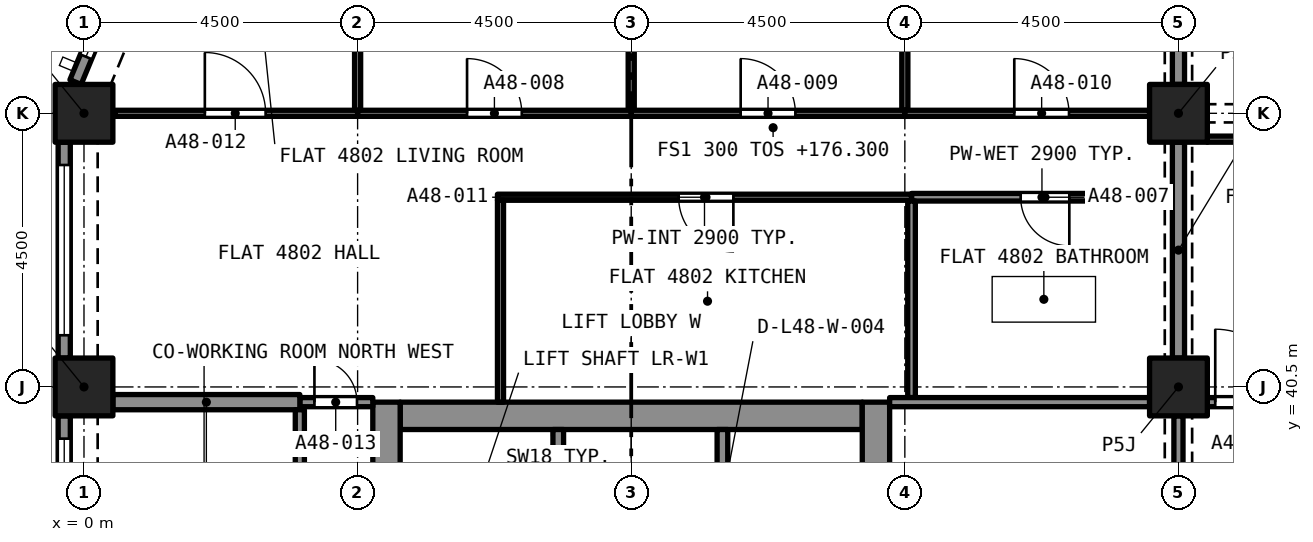
"""IFC4 building model, lengths in metres.
Left out: names, types, materials, properties, quantities, classifications, styles, units other than length and angle.
Written with IfcOpenShell. Run it as: python <this file> out.ifc"""

import sys

from ifc_helpers import new_model, si_unit, direction, frame, frame_2d, origin, origin_2d, place, context, subcontext, project, spatial, rectangle, extrude, element, fill, save


model = new_model("IFC4")
c1 = context("Model", 3, precision=1e-05, world=origin(), true_north=direction((0.0, 1.0)))
c2 = subcontext(c1, "Body", "Model", "MODEL_VIEW")
j1 = project(units=[si_unit("LENGTHUNIT", "METRE"), si_unit("PLANEANGLEUNIT", "RADIAN")], contexts=[c1])
p1 = place(None, origin())
s1 = spatial("IfcSite", under=j1, at=p1, CompositionType="ELEMENT")
p2 = place(p1, origin())
s2 = spatial("IfcBuilding", under=s1, at=p2, CompositionType="ELEMENT")
p3 = place(p2, frame((0.0, 0.0, 176.3)))
s3 = spatial("IfcBuildingStorey", under=s2, at=p3, CompositionType="ELEMENT", Elevation=176.3)
for number, where, z_axis, x_axis in (
    (1, (0.0, 40.5, 0.0), (0.0, 0.0, 1.0), (1.0, 0.0, 0.0)),
    (2, (18.0, 40.5, 0.0), (0.0, 0.0, 1.0), (1.0, 0.0, 0.0)),
    (3, (0.0, 45.0, 0.0), (0.0, 0.0, 1.0), (1.0, 0.0, 0.0)),
    (4, (18.0, 45.0, 0.0), (0.0, 0.0, 1.0), (1.0, 0.0, 0.0)),
):
    element("IfcColumn", number, at=place(p3, frame(where, z_axis=z_axis, x_axis=x_axis)), inside=s3, PredefinedType="COLUMN", context=c2, shape_type="SweptSolid", body=[
        extrude(rectangle(XDim=0.95, YDim=0.95, at=origin_2d()), origin(), (0.0, 0.0, 1.0), 3.2),
    ])
p4 = place(p3, frame((5.2, 40.025, 0.0), z_axis=(0.0, 0.0, 1.0), x_axis=(1.0, 0.0, 0.0)))
e5 = element("IfcWall", 5, at=p4, inside=s3, PredefinedType="SOLIDWALL", context=c2, shape_type="SweptSolid", body=[
    extrude(rectangle(XDim=7.6, YDim=0.45, at=frame_2d((3.8, 0.0))), origin(), (0.0, 0.0, 1.0), 3.2),
])
p5 = place(p3, frame((4.975, 27.25, 0.0), z_axis=(0.0, 0.0, 1.0), x_axis=(0.0, 1.0, 0.0)))
e6 = element("IfcWall", 6, at=p5, inside=s3, PredefinedType="SOLIDWALL", context=c2, shape_type="SweptSolid", body=[
    extrude(rectangle(XDim=13.0, YDim=0.45, at=frame_2d((6.5, 0.0))), origin(), (0.0, 0.0, 1.0), 3.2),
])
p6 = place(p5, frame((8.7, 0.0, 0.0)))
e7 = element("IfcOpeningElement", 7, at=p6, cuts=e6, PredefinedType="OPENING", context=c2, shape_type="SweptSolid", body=[
    extrude(rectangle(XDim=1.2, YDim=2.1, at=frame_2d((0.6, 1.05))), frame((0.0, 0.235, 0.0), z_axis=(0.0, -1.0, 0.0), x_axis=(1.0, 0.0, 0.0)), (0.0, 0.0, 1.0), 0.47),
])
p7 = place(p3, frame((13.025, 27.25, 0.0), z_axis=(0.0, 0.0, 1.0), x_axis=(0.0, 1.0, 0.0)))
e8 = element("IfcWall", 8, at=p7, inside=s3, PredefinedType="SOLIDWALL", context=c2, shape_type="SweptSolid", body=[
    extrude(rectangle(XDim=13.0, YDim=0.45, at=frame_2d((6.5, 0.0))), origin(), (0.0, 0.0, 1.0), 3.2),
])
p8 = place(p7, frame((10.85, 0.0, 0.0)))
e9 = element("IfcOpeningElement", 9, at=p8, cuts=e8, PredefinedType="OPENING", context=c2, shape_type="SweptSolid", body=[
    extrude(rectangle(XDim=1.1, YDim=2.1, at=frame_2d((0.55, 1.05))), frame((0.0, 0.235, 0.0), z_axis=(0.0, -1.0, 0.0), x_axis=(1.0, 0.0, 0.0)), (0.0, 0.0, 1.0), 0.47),
])
p9 = place(p7, frame((8.7, 0.0, 0.0)))
e10 = element("IfcOpeningElement", 10, at=p9, cuts=e8, PredefinedType="OPENING", context=c2, shape_type="SweptSolid", body=[
    extrude(rectangle(XDim=1.2, YDim=2.1, at=frame_2d((0.6, 1.05))), frame((0.0, 0.235, 0.0), z_axis=(0.0, -1.0, 0.0), x_axis=(1.0, 0.0, 0.0)), (0.0, 0.0, 1.0), 0.47),
])
p10 = place(p3, frame((-0.139, 45.513, 0.0), z_axis=(0.0, 0.0, 1.0), x_axis=(0.382680855588, 0.923880599843, 0.0)))
e11 = element("IfcWall", 11, at=p10, inside=s3, PredefinedType="SOLIDWALL", context=c2, shape_type="SweptSolid", body=[
    extrude(rectangle(XDim=2.403, YDim=0.2, at=frame_2d((1.201, 0.0))), origin(), (0.0, 0.0, 1.0), 3.2),
])
p11 = place(p10, frame((0.451, 0.0, 0.45)))
e12 = element("IfcOpeningElement", 12, at=p11, cuts=e11, PredefinedType="OPENING", context=c2, shape_type="SweptSolid", body=[
    extrude(rectangle(XDim=1.7, YDim=1.95, at=frame_2d((0.85, 0.975))), frame((0.0, 0.11, 0.0), z_axis=(0.0, -1.0, 0.0), x_axis=(1.0, 0.0, 0.0)), (0.0, 0.0, 1.0), 0.22),
])
p12 = place(p3, frame((-0.325, 40.975, 0.0), z_axis=(0.0, 0.0, 1.0), x_axis=(0.0, 1.0, 0.0)))
e13 = element("IfcWall", 13, at=p12, inside=s3, PredefinedType="SOLIDWALL", context=c2, shape_type="SweptSolid", body=[
    extrude(rectangle(XDim=3.55, YDim=0.2, at=frame_2d((1.775, 0.0))), origin(), (0.0, 0.0, 1.0), 3.2),
])
p13 = place(p12, frame((0.375, 0.0, 0.45)))
e14 = element("IfcOpeningElement", 14, at=p13, cuts=e13, PredefinedType="OPENING", context=c2, shape_type="SweptSolid", body=[
    extrude(rectangle(XDim=2.8, YDim=1.95, at=frame_2d((1.4, 0.975))), frame((0.0, 0.11, 0.0), z_axis=(0.0, -1.0, 0.0), x_axis=(1.0, 0.0, 0.0)), (0.0, 0.0, 1.0), 0.22),
])
p14 = place(p3, frame((-0.325, 36.475, 0.0), z_axis=(0.0, 0.0, 1.0), x_axis=(0.0, 1.0, 0.0)))
e15 = element("IfcWall", 15, at=p14, inside=s3, PredefinedType="SOLIDWALL", context=c2, shape_type="SweptSolid", body=[
    extrude(rectangle(XDim=3.55, YDim=0.2, at=frame_2d((1.775, 0.0))), origin(), (0.0, 0.0, 1.0), 3.2),
])
p15 = place(p14, frame((0.375, 0.0, 0.45)))
e16 = element("IfcOpeningElement", 16, at=p15, cuts=e15, PredefinedType="OPENING", context=c2, shape_type="SweptSolid", body=[
    extrude(rectangle(XDim=2.8, YDim=1.95, at=frame_2d((1.4, 0.975))), frame((0.0, 0.11, 0.0), z_axis=(0.0, -1.0, 0.0), x_axis=(1.0, 0.0, 0.0)), (0.0, 0.0, 1.0), 0.22),
])
p16 = place(p3, frame((17.9, 43.62, 0.0), z_axis=(0.0, 0.0, 1.0), x_axis=(-1.0, 0.0, 0.0)))
e17 = element("IfcWall", 17, at=p16, inside=s3, PredefinedType="PARTITIONING", context=c2, shape_type="SweptSolid", body=[
    extrude(rectangle(XDim=4.29, YDim=0.125, at=frame_2d((2.145, 0.0))), origin(), (0.0, 0.0, 1.0), 2.9),
])
p17 = place(p16, frame((1.695, 0.0, 0.0)))
e18 = element("IfcOpeningElement", 18, at=p17, cuts=e17, PredefinedType="OPENING", context=c2, shape_type="SweptSolid", body=[
    extrude(rectangle(XDim=0.8, YDim=2.1, at=frame_2d((0.4, 1.05))), frame((0.0, 0.073, 0.0), z_axis=(0.0, -1.0, 0.0), x_axis=(1.0, 0.0, 0.0)), (0.0, 0.0, 1.0), 0.145),
])
p18 = place(p3, frame((13.61, 40.325, 0.0), z_axis=(0.0, 0.0, 1.0), x_axis=(0.0, 1.0, 0.0)))
e19 = element("IfcWall", 19, at=p18, inside=s3, PredefinedType="PARTITIONING", context=c2, shape_type="SweptSolid", body=[
    extrude(rectangle(XDim=3.233, YDim=0.125, at=frame_2d((1.616, 0.0))), origin(), (0.0, 0.0, 1.0), 2.9),
])
p19 = place(p3, frame((18.0, 40.975, 0.0), z_axis=(0.0, 0.0, 1.0), x_axis=(0.0, 1.0, 0.0)))
e20 = element("IfcWall", 20, at=p19, inside=s3, PredefinedType="PARTITIONING", context=c2, shape_type="SweptSolid", body=[
    extrude(rectangle(XDim=3.55, YDim=0.2, at=frame_2d((1.775, 0.0))), origin(), (0.0, 0.0, 1.0), 2.38),
])
p20 = place(p3, frame((9.0, 45.05, 0.0), z_axis=(0.0, 0.0, 1.0), x_axis=(0.0, 1.0, 0.0)))
e21 = element("IfcWall", 21, at=p20, inside=s3, PredefinedType="PARTITIONING", context=c2, shape_type="SweptSolid", body=[
    extrude(rectangle(XDim=3.975, YDim=0.1, at=frame_2d((1.987, 0.0))), origin(), (0.0, 0.0, 1.0), 2.9),
])
p21 = place(p3, frame((4.5, 45.0, 0.0), z_axis=(0.0, 0.0, 1.0), x_axis=(1.0, 0.0, 0.0)))
e22 = element("IfcWall", 22, at=p21, inside=s3, PredefinedType="PARTITIONING", context=c2, shape_type="SweptSolid", body=[
    extrude(rectangle(XDim=4.5, YDim=0.1, at=frame_2d((2.25, 0.0))), origin(), (0.0, 0.0, 1.0), 2.9),
])
p22 = place(p21, frame((1.8, 0.0, 0.0)))
e23 = element("IfcOpeningElement", 23, at=p22, cuts=e22, PredefinedType="OPENING", context=c2, shape_type="SweptSolid", body=[
    extrude(rectangle(XDim=0.9, YDim=2.1, at=frame_2d((0.45, 1.05))), frame((0.0, 0.06, 0.0), z_axis=(0.0, -1.0, 0.0), x_axis=(1.0, 0.0, 0.0)), (0.0, 0.0, 1.0), 0.12),
])
p23 = place(p3, frame((4.5, 45.05, 0.0), z_axis=(0.0, 0.0, 1.0), x_axis=(0.0, 1.0, 0.0)))
e24 = element("IfcWall", 24, at=p23, inside=s3, PredefinedType="PARTITIONING", context=c2, shape_type="SweptSolid", body=[
    extrude(rectangle(XDim=3.936, YDim=0.1, at=frame_2d((1.968, 0.0))), origin(), (0.0, 0.0, 1.0), 2.9),
])
p24 = place(p3, frame((13.5, 45.05, 0.0), z_axis=(0.0, 0.0, 1.0), x_axis=(0.0, 1.0, 0.0)))
e25 = element("IfcWall", 25, at=p24, inside=s3, PredefinedType="PARTITIONING", context=c2, shape_type="SweptSolid", body=[
    extrude(rectangle(XDim=3.975, YDim=0.1, at=frame_2d((1.987, 0.0))), origin(), (0.0, 0.0, 1.0), 2.9),
])
p25 = place(p3, frame((9.0, 45.0, 0.0), z_axis=(0.0, 0.0, 1.0), x_axis=(1.0, 0.0, 0.0)))
e26 = element("IfcWall", 26, at=p25, inside=s3, PredefinedType="PARTITIONING", context=c2, shape_type="SweptSolid", body=[
    extrude(rectangle(XDim=4.5, YDim=0.1, at=frame_2d((2.25, 0.0))), origin(), (0.0, 0.0, 1.0), 2.9),
])
p26 = place(p25, frame((1.8, 0.0, 0.0)))
e27 = element("IfcOpeningElement", 27, at=p26, cuts=e26, PredefinedType="OPENING", context=c2, shape_type="SweptSolid", body=[
    extrude(rectangle(XDim=0.9, YDim=2.1, at=frame_2d((0.45, 1.05))), frame((0.0, 0.06, 0.0), z_axis=(0.0, -1.0, 0.0), x_axis=(1.0, 0.0, 0.0)), (0.0, 0.0, 1.0), 0.12),
])
p27 = place(p3, frame((13.5, 45.0, 0.0), z_axis=(0.0, 0.0, 1.0), x_axis=(1.0, 0.0, 0.0)))
e28 = element("IfcWall", 28, at=p27, inside=s3, PredefinedType="PARTITIONING", context=c2, shape_type="SweptSolid", body=[
    extrude(rectangle(XDim=4.025, YDim=0.1, at=frame_2d((2.012, 0.0))), origin(), (0.0, 0.0, 1.0), 2.9),
])
p28 = place(p27, frame((1.8, 0.0, 0.0)))
e29 = element("IfcOpeningElement", 29, at=p28, cuts=e28, PredefinedType="OPENING", context=c2, shape_type="SweptSolid", body=[
    extrude(rectangle(XDim=0.9, YDim=2.1, at=frame_2d((0.45, 1.05))), frame((0.0, 0.06, 0.0), z_axis=(0.0, -1.0, 0.0), x_axis=(1.0, 0.0, 0.0)), (0.0, 0.0, 1.0), 0.12),
])
p29 = place(p3, frame((18.0, 45.475, 0.0), z_axis=(0.0, 0.0, 1.0), x_axis=(0.0, 1.0, 0.0)))
e30 = element("IfcWall", 30, at=p29, inside=s3, PredefinedType="PARTITIONING", context=c2, shape_type="SweptSolid", body=[
    extrude(rectangle(XDim=3.55, YDim=0.2, at=frame_2d((1.775, 0.0))), origin(), (0.0, 0.0, 1.0), 2.38),
])
p30 = place(p3, frame((13.61, 43.62, 0.0), z_axis=(0.0, 0.0, 1.0), x_axis=(-1.0, 0.0, 0.0)))
e31 = element("IfcWall", 31, at=p30, inside=s3, PredefinedType="PARTITIONING", context=c2, shape_type="SweptSolid", body=[
    extrude(rectangle(XDim=6.81, YDim=0.1, at=frame_2d((3.405, 0.0))), origin(), (0.0, 0.0, 1.0), 2.9),
])
p31 = place(p30, frame((2.93, 0.0, 0.0)))
e32 = element("IfcOpeningElement", 32, at=p31, cuts=e31, PredefinedType="OPENING", context=c2, shape_type="SweptSolid", body=[
    extrude(rectangle(XDim=0.9, YDim=2.1, at=frame_2d((0.45, 1.05))), frame((0.0, 0.06, 0.0), z_axis=(0.0, -1.0, 0.0), x_axis=(1.0, 0.0, 0.0)), (0.0, 0.0, 1.0), 0.12),
])
p32 = place(p3, frame((6.85, 40.25, 0.0), z_axis=(0.0, 0.0, 1.0), x_axis=(0.0, 1.0, 0.0)))
e33 = element("IfcWall", 33, at=p32, inside=s3, PredefinedType="PARTITIONING", context=c2, shape_type="SweptSolid", body=[
    extrude(rectangle(XDim=3.32, YDim=0.1, at=frame_2d((1.66, 0.0))), origin(), (0.0, 0.0, 1.0), 2.9),
])
p33 = place(p3, frame((0.514, 45.0, 0.0), z_axis=(0.0, 0.0, 1.0), x_axis=(1.0, 0.0, 0.0)))
e34 = element("IfcWall", 34, at=p33, inside=s3, PredefinedType="PARTITIONING", context=c2, shape_type="SweptSolid", body=[
    extrude(rectangle(XDim=3.986, YDim=0.1, at=frame_2d((1.993, 0.0))), origin(), (0.0, 0.0, 1.0), 2.9),
])
p34 = place(p33, frame((1.473, 0.0, 0.0)))
e35 = element("IfcOpeningElement", 35, at=p34, cuts=e34, PredefinedType="OPENING", context=c2, shape_type="SweptSolid", body=[
    extrude(rectangle(XDim=1.0, YDim=2.1, at=frame_2d((0.5, 1.05))), frame((0.0, 0.06, 0.0), z_axis=(0.0, -1.0, 0.0), x_axis=(1.0, 0.0, 0.0)), (0.0, 0.0, 1.0), 0.12),
])
p35 = place(p3, frame((3.55, 40.25, 0.0), z_axis=(0.0, 0.0, 1.0), x_axis=(1.0, 0.0, 0.0)))
e36 = element("IfcWall", 36, at=p35, inside=s3, PredefinedType="PARTITIONING", context=c2, shape_type="SweptSolid", body=[
    extrude(rectangle(XDim=1.2, YDim=0.15, at=frame_2d((0.6, 0.0))), origin(), (0.0, 0.0, 1.0), 2.9),
])
p36 = place(p35, frame((0.24, 0.0, 0.0)))
e37 = element("IfcOpeningElement", 37, at=p36, cuts=e36, PredefinedType="OPENING", context=c2, shape_type="SweptSolid", body=[
    extrude(rectangle(XDim=0.7, YDim=2.1, at=frame_2d((0.35, 1.05))), frame((0.0, 0.085, 0.0), z_axis=(0.0, -1.0, 0.0), x_axis=(1.0, 0.0, 0.0)), (0.0, 0.0, 1.0), 0.17),
])
p37 = place(p3, frame((0.475, 40.25, 0.0), z_axis=(0.0, 0.0, 1.0), x_axis=(1.0, 0.0, 0.0)))
e38 = element("IfcWall", 38, at=p37, inside=s3, PredefinedType="PARTITIONING", context=c2, shape_type="SweptSolid", body=[
    extrude(rectangle(XDim=3.075, YDim=0.25, at=frame_2d((1.538, 0.0))), origin(), (0.0, 0.0, 1.0), 2.9),
])
p38 = place(p3, frame((13.25, 40.25, 0.0), z_axis=(0.0, 0.0, 1.0), x_axis=(1.0, 0.0, 0.0)))
e39 = element("IfcWall", 39, at=p38, inside=s3, PredefinedType="PARTITIONING", context=c2, shape_type="SweptSolid", body=[
    extrude(rectangle(XDim=4.275, YDim=0.15, at=frame_2d((2.137, 0.0))), origin(), (0.0, 0.0, 1.0), 2.9),
])
p39 = place(p3, frame((18.475, 44.575, 0.0), z_axis=(0.0, 0.0, 1.0), x_axis=(1.0, 0.0, 0.0)))
e40 = element("IfcWall", 40, at=p39, inside=s3, PredefinedType="PARTITIONING", context=c2, shape_type="SweptSolid", body=[
    extrude(rectangle(XDim=4.025, YDim=0.1, at=frame_2d((2.012, 0.0))), origin(), (0.0, 0.0, 1.0), 2.75),
])
p40 = place(p39, frame((1.325, 0.0, 0.0)))
e41 = element("IfcOpeningElement", 41, at=p40, cuts=e40, PredefinedType="OPENING", context=c2, shape_type="SweptSolid", body=[
    extrude(rectangle(XDim=0.9, YDim=2.1, at=frame_2d((0.45, 1.05))), frame((0.0, 0.06, 0.0), z_axis=(0.0, -1.0, 0.0), x_axis=(1.0, 0.0, 0.0)), (0.0, 0.0, 1.0), 0.12),
])
p41 = place(p3, frame((18.475, 40.25, 0.0), z_axis=(0.0, 0.0, 1.0), x_axis=(1.0, 0.0, 0.0)))
e42 = element("IfcWall", 42, at=p41, inside=s3, PredefinedType="PARTITIONING", context=c2, shape_type="SweptSolid", body=[
    extrude(rectangle(XDim=1.925, YDim=0.15, at=frame_2d((0.962, 0.0))), origin(), (0.0, 0.0, 1.0), 2.75),
])
p42 = place(p41, frame((0.13, 0.0, 0.0)))
e43 = element("IfcOpeningElement", 43, at=p42, cuts=e42, PredefinedType="OPENING", context=c2, shape_type="SweptSolid", body=[
    extrude(rectangle(XDim=1.2, YDim=2.4, at=frame_2d((0.6, 1.2))), frame((0.0, 0.085, 0.0), z_axis=(0.0, -1.0, 0.0), x_axis=(1.0, 0.0, 0.0)), (0.0, 0.0, 1.0), 0.17),
])
p43 = place(p3, frame((18.0, 40.025, 0.0), z_axis=(0.0, 0.0, 1.0), x_axis=(0.0, -1.0, 0.0)))
e44 = element("IfcWall", 44, at=p43, inside=s3, PredefinedType="PARTITIONING", context=c2, shape_type="SweptSolid", body=[
    extrude(rectangle(XDim=3.55, YDim=0.15, at=frame_2d((1.775, 0.0))), origin(), (0.0, 0.0, 1.0), 2.38),
])
p44 = place(p43, frame((1.175, 0.0, 0.0)))
e45 = element("IfcOpeningElement", 45, at=p44, cuts=e44, PredefinedType="OPENING", context=c2, shape_type="SweptSolid", body=[
    extrude(rectangle(XDim=1.2, YDim=2.1, at=frame_2d((0.6, 1.05))), frame((0.0, 0.085, 0.0), z_axis=(0.0, -1.0, 0.0), x_axis=(1.0, 0.0, 0.0)), (0.0, 0.0, 1.0), 0.17),
])
p45 = place(p3, frame((3.55, 36.0, 0.0), z_axis=(0.0, 0.0, 1.0), x_axis=(0.0, 1.0, 0.0)))
e46 = element("IfcWall", 46, at=p45, inside=s3, PredefinedType="PARTITIONING", context=c2, shape_type="SweptSolid", body=[
    extrude(rectangle(XDim=4.125, YDim=0.15, at=frame_2d((2.062, 0.0))), origin(), (0.0, 0.0, 1.0), 2.9),
])
p46 = place(p45, frame((1.625, 0.0, 0.0)))
e47 = element("IfcOpeningElement", 47, at=p46, cuts=e46, PredefinedType="OPENING", context=c2, shape_type="SweptSolid", body=[
    extrude(rectangle(XDim=1.0, YDim=2.1, at=frame_2d((0.5, 1.05))), frame((0.0, 0.085, 0.0), z_axis=(0.0, -1.0, 0.0), x_axis=(1.0, 0.0, 0.0)), (0.0, 0.0, 1.0), 0.17),
])
p47 = place(p3, frame((7.8, 37.5, 0.0), z_axis=(0.0, 0.0, 1.0), x_axis=(0.0, 1.0, 0.0)))
e48 = element("IfcWall", 48, at=p47, inside=s3, PredefinedType="SOLIDWALL", context=c2, shape_type="SweptSolid", body=[
    extrude(rectangle(XDim=2.3, YDim=0.175, at=frame_2d((1.15, 0.0))), origin(), (0.0, 0.0, 1.0), 2.9),
])
p48 = place(p3, frame((10.5, 37.5, 0.0), z_axis=(0.0, 0.0, 1.0), x_axis=(0.0, 1.0, 0.0)))
e49 = element("IfcWall", 49, at=p48, inside=s3, PredefinedType="SOLIDWALL", context=c2, shape_type="SweptSolid", body=[
    extrude(rectangle(XDim=2.3, YDim=0.175, at=frame_2d((1.15, 0.0))), origin(), (0.0, 0.0, 1.0), 2.9),
])
p49 = place(p48, frame((0.65, 0.0, 0.0)))
e50 = element("IfcOpeningElement", 50, at=p49, cuts=e49, PredefinedType="OPENING", context=c2, shape_type="SweptSolid", body=[
    extrude(rectangle(XDim=1.0, YDim=2.1, at=frame_2d((0.5, 1.05))), frame((0.0, 0.097, 0.0), z_axis=(0.0, -1.0, 0.0), x_axis=(1.0, 0.0, 0.0)), (0.0, 0.0, 1.0), 0.195),
])
p50 = place(p11, origin())
e51 = element("IfcWindow", 51, at=p50, inside=s3, PartitioningType="SINGLE_PANEL", PredefinedType="WINDOW", context=c2, shape_type="SweptSolid", body=[
    extrude(rectangle(XDim=1.7, YDim=1.95, at=frame_2d((0.85, 0.975))), frame((0.0, 0.03, 0.0), z_axis=(0.0, -1.0, 0.0), x_axis=(1.0, 0.0, 0.0)), (0.0, 0.0, 1.0), 0.06),
])
fill(e12, e51)
p51 = place(p13, origin())
e52 = element("IfcWindow", 52, at=p51, inside=s3, PartitioningType="SINGLE_PANEL", PredefinedType="WINDOW", context=c2, shape_type="SweptSolid", body=[
    extrude(rectangle(XDim=2.8, YDim=1.95, at=frame_2d((1.4, 0.975))), frame((0.0, 0.03, 0.0), z_axis=(0.0, -1.0, 0.0), x_axis=(1.0, 0.0, 0.0)), (0.0, 0.0, 1.0), 0.06),
])
fill(e14, e52)
p52 = place(p15, origin())
e53 = element("IfcWindow", 53, at=p52, inside=s3, PartitioningType="SINGLE_PANEL", PredefinedType="WINDOW", context=c2, shape_type="SweptSolid", body=[
    extrude(rectangle(XDim=2.8, YDim=1.95, at=frame_2d((1.4, 0.975))), frame((0.0, 0.03, 0.0), z_axis=(0.0, -1.0, 0.0), x_axis=(1.0, 0.0, 0.0)), (0.0, 0.0, 1.0), 0.06),
])
fill(e16, e53)
p53 = place(p17, origin())
e54 = element("IfcDoor", 54, at=p53, inside=s3, OperationType="SINGLE_SWING_LEFT", PredefinedType="DOOR", context=c2, shape_type="SweptSolid", body=[
    extrude(rectangle(XDim=0.8, YDim=2.1, at=frame_2d((0.4, 1.05))), frame((0.0, 0.025, 0.0), z_axis=(0.0, -1.0, 0.0), x_axis=(1.0, 0.0, 0.0)), (0.0, 0.0, 1.0), 0.05),
])
fill(e18, e54)
p54 = place(p22, origin())
e55 = element("IfcDoor", 55, at=p54, inside=s3, OperationType="SINGLE_SWING_LEFT", PredefinedType="DOOR", context=c2, shape_type="SweptSolid", body=[
    extrude(rectangle(XDim=0.9, YDim=2.1, at=frame_2d((0.45, 1.05))), frame((0.0, 0.025, 0.0), z_axis=(0.0, -1.0, 0.0), x_axis=(1.0, 0.0, 0.0)), (0.0, 0.0, 1.0), 0.05),
])
fill(e23, e55)
p55 = place(p26, origin())
e56 = element("IfcDoor", 56, at=p55, inside=s3, OperationType="SINGLE_SWING_LEFT", PredefinedType="DOOR", context=c2, shape_type="SweptSolid", body=[
    extrude(rectangle(XDim=0.9, YDim=2.1, at=frame_2d((0.45, 1.05))), frame((0.0, 0.025, 0.0), z_axis=(0.0, -1.0, 0.0), x_axis=(1.0, 0.0, 0.0)), (0.0, 0.0, 1.0), 0.05),
])
fill(e27, e56)
p56 = place(p28, origin())
e57 = element("IfcDoor", 57, at=p56, inside=s3, OperationType="SINGLE_SWING_RIGHT", PredefinedType="DOOR", context=c2, shape_type="SweptSolid", body=[
    extrude(rectangle(XDim=0.9, YDim=2.1, at=frame_2d((0.45, 1.05))), frame((0.0, 0.025, 0.0), z_axis=(0.0, -1.0, 0.0), x_axis=(1.0, 0.0, 0.0)), (0.0, 0.0, 1.0), 0.05),
])
fill(e29, e57)
p57 = place(p31, origin())
e58 = element("IfcDoor", 58, at=p57, inside=s3, OperationType="SINGLE_SWING_LEFT", PredefinedType="DOOR", context=c2, shape_type="SweptSolid", body=[
    extrude(rectangle(XDim=0.9, YDim=2.1, at=frame_2d((0.45, 1.05))), frame((0.0, 0.025, 0.0), z_axis=(0.0, -1.0, 0.0), x_axis=(1.0, 0.0, 0.0)), (0.0, 0.0, 1.0), 0.05),
])
fill(e32, e58)
p58 = place(p34, origin())
e59 = element("IfcDoor", 59, at=p58, inside=s3, OperationType="SINGLE_SWING_LEFT", PredefinedType="DOOR", context=c2, shape_type="SweptSolid", body=[
    extrude(rectangle(XDim=1.0, YDim=2.1, at=frame_2d((0.5, 1.05))), frame((0.0, 0.025, 0.0), z_axis=(0.0, -1.0, 0.0), x_axis=(1.0, 0.0, 0.0)), (0.0, 0.0, 1.0), 0.05),
])
fill(e35, e59)
p59 = place(p36, origin())
e60 = element("IfcDoor", 60, at=p59, inside=s3, OperationType="SINGLE_SWING_LEFT", PredefinedType="DOOR", context=c2, shape_type="SweptSolid", body=[
    extrude(rectangle(XDim=0.7, YDim=2.1, at=frame_2d((0.35, 1.05))), frame((0.0, 0.025, 0.0), z_axis=(0.0, -1.0, 0.0), x_axis=(1.0, 0.0, 0.0)), (0.0, 0.0, 1.0), 0.05),
])
fill(e37, e60)
p60 = place(p42, origin())
e61 = element("IfcDoor", 61, at=p60, inside=s3, OperationType="SINGLE_SWING_LEFT", PredefinedType="DOOR", context=c2, shape_type="SweptSolid", body=[
    extrude(rectangle(XDim=1.2, YDim=2.4, at=frame_2d((0.6, 1.2))), frame((0.0, 0.025, 0.0), z_axis=(0.0, -1.0, 0.0), x_axis=(1.0, 0.0, 0.0)), (0.0, 0.0, 1.0), 0.05),
])
fill(e43, e61)
save(model, sys.argv[1])
